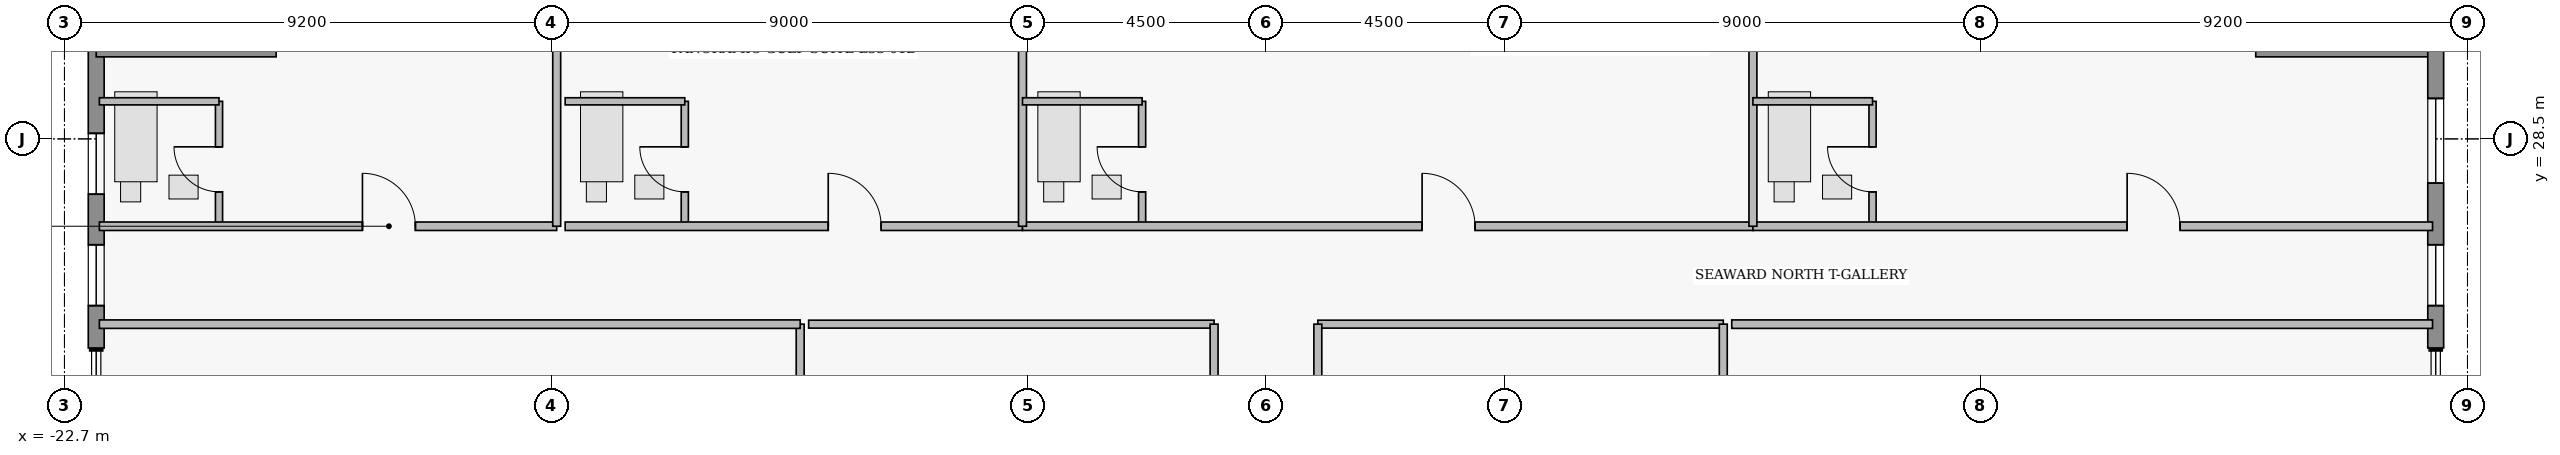
"""IFC4 building model, lengths in metres.
Left out: names, types, materials, properties, quantities, classifications, styles, units other than length and angle.
Written with IfcOpenShell. Run it as: python <this file> out.ifc"""

import sys

from ifc_helpers import new_model, si_unit, direction, frame, frame_2d, origin, place, context, subcontext, project, spatial, rectangle, extrude, element, fill, save


model = new_model("IFC4")
c1 = context("Model", 3, precision=1e-05, world=origin(), true_north=direction((0.0, 1.0)))
c2 = subcontext(c1, "Body", "Model", "MODEL_VIEW")
j1 = project(units=[si_unit("LENGTHUNIT", "METRE"), si_unit("PLANEANGLEUNIT", "RADIAN")], contexts=[c1])
p1 = place(None, origin())
s1 = spatial("IfcSite", under=j1, at=p1, CompositionType="ELEMENT")
p2 = place(p1, origin())
s2 = spatial("IfcBuilding", under=s1, at=p2, CompositionType="ELEMENT")
p3 = place(p2, frame((0.0, 0.0, 211.15)))
s3 = spatial("IfcBuildingStorey", under=s2, at=p3, CompositionType="ELEMENT", Elevation=211.15)
p4 = place(p3, frame((-22.1, 24.55, 0.0), z_axis=(0.0, 0.0, 1.0), x_axis=(0.0, 1.0, 0.0)))
e1 = element("IfcWall", 1, at=p4, inside=s3, PredefinedType="STANDARD", context=c2, shape_type="SweptSolid", body=[
    extrude(rectangle(XDim=5.65, YDim=0.3, at=frame_2d((2.825, 0.0))), origin(), (0.0, 0.0, 1.0), 3.53),
])
p5 = place(p4, frame((0.8, 0.0, 0.95)))
e2 = element("IfcOpeningElement", 2, at=p5, cuts=e1, PredefinedType="OPENING", context=c2, shape_type="SweptSolid", body=[
    extrude(rectangle(XDim=1.15, YDim=1.55, at=frame_2d((0.575, 0.775))), frame((0.0, 0.16, 0.0), z_axis=(0.0, -1.0, 0.0), x_axis=(1.0, 0.0, 0.0)), (0.0, 0.0, 1.0), 0.32),
])
p6 = place(p4, frame((2.905, 0.0, 0.95)))
e3 = element("IfcOpeningElement", 3, at=p6, cuts=e1, PredefinedType="OPENING", context=c2, shape_type="SweptSolid", body=[
    extrude(rectangle(XDim=1.15, YDim=1.55, at=frame_2d((0.575, 0.775))), frame((0.0, 0.16, 0.0), z_axis=(0.0, -1.0, 0.0), x_axis=(1.0, 0.0, 0.0)), (0.0, 0.0, 1.0), 0.32),
])
for number, where, z_axis, x_axis in (
    (4, (-22.1, 30.2, 0.0), (0.0, 0.0, 1.0), (1.0, 0.0, 0.0)),
    (5, (18.7, 30.2, 0.0), (0.0, 0.0, 1.0), (1.0, 0.0, 0.0)),
):
    element("IfcWall", number, at=place(p3, frame(where, z_axis=z_axis, x_axis=x_axis)), inside=s3, PredefinedType="STANDARD", context=c2, shape_type="SweptSolid", body=[
        extrude(rectangle(XDim=3.4, YDim=0.3, at=frame_2d((1.7, 0.0))), origin(), (0.0, 0.0, 1.0), 3.53),
    ])
p7 = place(p3, frame((22.1, 30.2, 0.0), z_axis=(0.0, 0.0, 1.0), x_axis=(0.0, -1.0, 0.0)))
e6 = element("IfcWall", 6, at=p7, inside=s3, PredefinedType="STANDARD", context=c2, shape_type="SweptSolid", body=[
    extrude(rectangle(XDim=5.65, YDim=0.3, at=frame_2d((2.825, 0.0))), origin(), (0.0, 0.0, 1.0), 3.53),
])
p8 = place(p7, frame((0.935, 0.0, 0.85)))
e7 = element("IfcOpeningElement", 7, at=p8, cuts=e6, PredefinedType="OPENING", context=c2, shape_type="SweptSolid", body=[
    extrude(rectangle(XDim=1.6, YDim=1.8, at=frame_2d((0.8, 0.9))), frame((0.0, 0.16, 0.0), z_axis=(0.0, -1.0, 0.0), x_axis=(1.0, 0.0, 0.0)), (0.0, 0.0, 1.0), 0.32),
])
p9 = place(p7, frame((3.7, 0.0, 0.95)))
e8 = element("IfcOpeningElement", 8, at=p9, cuts=e6, PredefinedType="OPENING", context=c2, shape_type="SweptSolid", body=[
    extrude(rectangle(XDim=1.15, YDim=1.55, at=frame_2d((0.575, 0.775))), frame((0.0, 0.16, 0.0), z_axis=(0.0, -1.0, 0.0), x_axis=(1.0, 0.0, 0.0)), (0.0, 0.0, 1.0), 0.32),
])
p10 = place(p3, frame((-19.78, 26.85, 0.0), z_axis=(0.0, 0.0, 1.0), x_axis=(0.0, 1.0, 0.0)))
e9 = element("IfcWall", 9, at=p10, inside=s3, PredefinedType="PLUMBINGWALL", context=c2, shape_type="SweptSolid", body=[
    extrude(rectangle(XDim=2.36, YDim=0.135, at=frame_2d((1.18, 0.0))), origin(), (0.0, 0.0, 1.0), 3.53),
])
p11 = place(p10, frame((0.65, 0.0, 0.0)))
e10 = element("IfcOpeningElement", 10, at=p11, cuts=e9, PredefinedType="OPENING", context=c2, shape_type="SweptSolid", body=[
    extrude(rectangle(XDim=0.85, YDim=2.1, at=frame_2d((0.425, 1.05))), frame((0.0, 0.077, 0.0), z_axis=(0.0, -1.0, 0.0), x_axis=(1.0, 0.0, 0.0)), (0.0, 0.0, 1.0), 0.155),
])
p12 = place(p3, frame((-22.04, 26.85, 0.0), z_axis=(0.0, 0.0, 1.0), x_axis=(1.0, 0.0, 0.0)))
e11 = element("IfcWall", 11, at=p12, inside=s3, PredefinedType="PARTITIONING", context=c2, shape_type="SweptSolid", body=[
    extrude(rectangle(XDim=8.64, YDim=0.16, at=frame_2d((4.32, 0.0))), origin(), (0.0, 0.0, 1.0), 3.53),
])
p13 = place(p12, frame((4.97, 0.0, 0.0)))
e12 = element("IfcOpeningElement", 12, at=p13, cuts=e11, PredefinedType="OPENING", context=c2, shape_type="SweptSolid", body=[
    extrude(rectangle(XDim=1.0, YDim=2.15, at=frame_2d((0.5, 1.075))), frame((0.0, 0.09, 0.0), z_axis=(0.0, -1.0, 0.0), x_axis=(1.0, 0.0, 0.0)), (0.0, 0.0, 1.0), 0.18),
])
p14 = place(p3, frame((-10.98, 26.85, 0.0), z_axis=(0.0, 0.0, 1.0), x_axis=(0.0, 1.0, 0.0)))
e13 = element("IfcWall", 13, at=p14, inside=s3, PredefinedType="PLUMBINGWALL", context=c2, shape_type="SweptSolid", body=[
    extrude(rectangle(XDim=2.36, YDim=0.135, at=frame_2d((1.18, 0.0))), origin(), (0.0, 0.0, 1.0), 3.53),
])
p15 = place(p14, frame((0.65, 0.0, 0.0)))
e14 = element("IfcOpeningElement", 14, at=p15, cuts=e13, PredefinedType="OPENING", context=c2, shape_type="SweptSolid", body=[
    extrude(rectangle(XDim=0.85, YDim=2.1, at=frame_2d((0.425, 1.05))), frame((0.0, 0.077, 0.0), z_axis=(0.0, -1.0, 0.0), x_axis=(1.0, 0.0, 0.0)), (0.0, 0.0, 1.0), 0.155),
])
p16 = place(p3, frame((-13.24, 26.85, 0.0), z_axis=(0.0, 0.0, 1.0), x_axis=(1.0, 0.0, 0.0)))
e15 = element("IfcWall", 15, at=p16, inside=s3, PredefinedType="PARTITIONING", context=c2, shape_type="SweptSolid", body=[
    extrude(rectangle(XDim=8.64, YDim=0.16, at=frame_2d((4.32, 0.0))), origin(), (0.0, 0.0, 1.0), 3.53),
])
p17 = place(p16, frame((4.97, 0.0, 0.0)))
e16 = element("IfcOpeningElement", 16, at=p17, cuts=e15, PredefinedType="OPENING", context=c2, shape_type="SweptSolid", body=[
    extrude(rectangle(XDim=1.0, YDim=2.15, at=frame_2d((0.5, 1.075))), frame((0.0, 0.09, 0.0), z_axis=(0.0, -1.0, 0.0), x_axis=(1.0, 0.0, 0.0)), (0.0, 0.0, 1.0), 0.18),
])
p18 = place(p3, frame((-2.34, 26.85, 0.0), z_axis=(0.0, 0.0, 1.0), x_axis=(0.0, 1.0, 0.0)))
e17 = element("IfcWall", 17, at=p18, inside=s3, PredefinedType="PLUMBINGWALL", context=c2, shape_type="SweptSolid", body=[
    extrude(rectangle(XDim=2.36, YDim=0.135, at=frame_2d((1.18, 0.0))), origin(), (0.0, 0.0, 1.0), 3.53),
])
p19 = place(p18, frame((0.65, 0.0, 0.0)))
e18 = element("IfcOpeningElement", 18, at=p19, cuts=e17, PredefinedType="OPENING", context=c2, shape_type="SweptSolid", body=[
    extrude(rectangle(XDim=0.85, YDim=2.1, at=frame_2d((0.425, 1.05))), frame((0.0, 0.077, 0.0), z_axis=(0.0, -1.0, 0.0), x_axis=(1.0, 0.0, 0.0)), (0.0, 0.0, 1.0), 0.155),
])
p20 = place(p3, frame((-4.6, 26.85, 0.0), z_axis=(0.0, 0.0, 1.0), x_axis=(1.0, 0.0, 0.0)))
e19 = element("IfcWall", 19, at=p20, inside=s3, PredefinedType="PARTITIONING", context=c2, shape_type="SweptSolid", body=[
    extrude(rectangle(XDim=13.8, YDim=0.16, at=frame_2d((6.9, 0.0))), origin(), (0.0, 0.0, 1.0), 3.53),
])
p21 = place(p20, frame((7.55, 0.0, 0.0)))
e20 = element("IfcOpeningElement", 20, at=p21, cuts=e19, PredefinedType="OPENING", context=c2, shape_type="SweptSolid", body=[
    extrude(rectangle(XDim=1.0, YDim=2.15, at=frame_2d((0.5, 1.075))), frame((0.0, 0.09, 0.0), z_axis=(0.0, -1.0, 0.0), x_axis=(1.0, 0.0, 0.0)), (0.0, 0.0, 1.0), 0.18),
])
p22 = place(p3, frame((11.46, 26.85, 0.0), z_axis=(0.0, 0.0, 1.0), x_axis=(0.0, 1.0, 0.0)))
e21 = element("IfcWall", 21, at=p22, inside=s3, PredefinedType="PLUMBINGWALL", context=c2, shape_type="SweptSolid", body=[
    extrude(rectangle(XDim=2.36, YDim=0.135, at=frame_2d((1.18, 0.0))), origin(), (0.0, 0.0, 1.0), 3.53),
])
p23 = place(p22, frame((0.65, 0.0, 0.0)))
e22 = element("IfcOpeningElement", 22, at=p23, cuts=e21, PredefinedType="OPENING", context=c2, shape_type="SweptSolid", body=[
    extrude(rectangle(XDim=0.85, YDim=2.1, at=frame_2d((0.425, 1.05))), frame((0.0, 0.077, 0.0), z_axis=(0.0, -1.0, 0.0), x_axis=(1.0, 0.0, 0.0)), (0.0, 0.0, 1.0), 0.155),
])
p24 = place(p3, frame((9.2, 26.85, 0.0), z_axis=(0.0, 0.0, 1.0), x_axis=(1.0, 0.0, 0.0)))
e23 = element("IfcWall", 23, at=p24, inside=s3, PredefinedType="PARTITIONING", context=c2, shape_type="SweptSolid", body=[
    extrude(rectangle(XDim=12.84, YDim=0.16, at=frame_2d((6.42, 0.0))), origin(), (0.0, 0.0, 1.0), 3.53),
])
p25 = place(p24, frame((7.07, 0.0, 0.0)))
e24 = element("IfcOpeningElement", 24, at=p25, cuts=e23, PredefinedType="OPENING", context=c2, shape_type="SweptSolid", body=[
    extrude(rectangle(XDim=1.0, YDim=2.15, at=frame_2d((0.5, 1.075))), frame((0.0, 0.09, 0.0), z_axis=(0.0, -1.0, 0.0), x_axis=(1.0, 0.0, 0.0)), (0.0, 0.0, 1.0), 0.18),
])
p26 = place(p3, frame((-22.04, 29.21, 0.0), z_axis=(0.0, 0.0, 1.0), x_axis=(1.0, 0.0, 0.0)))
e25 = element("IfcWall", 25, at=p26, inside=s3, PredefinedType="PLUMBINGWALL", context=c2, shape_type="SweptSolid", body=[
    extrude(rectangle(XDim=2.26, YDim=0.135, at=frame_2d((1.13, 0.0))), origin(), (0.0, 0.0, 1.0), 3.53),
])
p27 = place(p3, frame((-13.4, 26.85, 0.0), z_axis=(0.0, 0.0, 1.0), x_axis=(0.0, 1.0, 0.0)))
e26 = element("IfcWall", 26, at=p27, inside=s3, PredefinedType="PARTITIONING", context=c2, shape_type="SweptSolid", body=[
    extrude(rectangle(XDim=6.67, YDim=0.15, at=frame_2d((3.335, 0.0))), origin(), (0.0, 0.0, 1.0), 2.519),
])
p28 = place(p3, frame((-13.24, 29.21, 0.0), z_axis=(0.0, 0.0, 1.0), x_axis=(1.0, 0.0, 0.0)))
e27 = element("IfcWall", 27, at=p28, inside=s3, PredefinedType="PLUMBINGWALL", context=c2, shape_type="SweptSolid", body=[
    extrude(rectangle(XDim=2.26, YDim=0.135, at=frame_2d((1.13, 0.0))), origin(), (0.0, 0.0, 1.0), 3.53),
])
p29 = place(p3, frame((-4.6, 26.85, 0.0), z_axis=(0.0, 0.0, 1.0), x_axis=(0.0, 1.0, 0.0)))
e28 = element("IfcWall", 28, at=p29, inside=s3, PredefinedType="PARTITIONING", context=c2, shape_type="SweptSolid", body=[
    extrude(rectangle(XDim=6.67, YDim=0.15, at=frame_2d((3.335, 0.0))), origin(), (0.0, 0.0, 1.0), 2.519),
])
p30 = place(p3, frame((-4.6, 29.21, 0.0), z_axis=(0.0, 0.0, 1.0), x_axis=(1.0, 0.0, 0.0)))
e29 = element("IfcWall", 29, at=p30, inside=s3, PredefinedType="PLUMBINGWALL", context=c2, shape_type="SweptSolid", body=[
    extrude(rectangle(XDim=2.26, YDim=0.135, at=frame_2d((1.13, 0.0))), origin(), (0.0, 0.0, 1.0), 3.53),
])
p31 = place(p3, frame((9.2, 26.85, 0.0), z_axis=(0.0, 0.0, 1.0), x_axis=(0.0, 1.0, 0.0)))
e30 = element("IfcWall", 30, at=p31, inside=s3, PredefinedType="PARTITIONING", context=c2, shape_type="SweptSolid", body=[
    extrude(rectangle(XDim=6.67, YDim=0.15, at=frame_2d((3.335, 0.0))), origin(), (0.0, 0.0, 1.0), 3.53),
])
p32 = place(p3, frame((9.2, 29.21, 0.0), z_axis=(0.0, 0.0, 1.0), x_axis=(1.0, 0.0, 0.0)))
e31 = element("IfcWall", 31, at=p32, inside=s3, PredefinedType="PLUMBINGWALL", context=c2, shape_type="SweptSolid", body=[
    extrude(rectangle(XDim=2.26, YDim=0.135, at=frame_2d((1.13, 0.0))), origin(), (0.0, 0.0, 1.0), 3.53),
])
p33 = place(p3, frame((-8.8, 16.7, 0.0), z_axis=(0.0, 0.0, 1.0), x_axis=(0.0, 1.0, 0.0)))
e32 = element("IfcWall", 32, at=p33, inside=s3, PredefinedType="PARTITIONING", context=c2, shape_type="SweptSolid", body=[
    extrude(rectangle(XDim=8.3, YDim=0.15, at=frame_2d((4.15, 0.0))), origin(), (0.0, 0.0, 1.0), 3.53),
])
p34 = place(p3, frame((-22.04, 25.0, 0.0), z_axis=(0.0, 0.0, 1.0), x_axis=(1.0, 0.0, 0.0)))
e33 = element("IfcWall", 33, at=p34, inside=s3, PredefinedType="PARTITIONING", context=c2, shape_type="SweptSolid", body=[
    extrude(rectangle(XDim=13.24, YDim=0.16, at=frame_2d((6.62, 0.0))), origin(), (0.0, 0.0, 1.0), 3.124),
])
p35 = place(p3, frame((-8.64, 25.0, 0.0), z_axis=(0.0, 0.0, 1.0), x_axis=(1.0, 0.0, 0.0)))
e34 = element("IfcWall", 34, at=p35, inside=s3, PredefinedType="PARTITIONING", context=c2, shape_type="SweptSolid", body=[
    extrude(rectangle(XDim=7.66, YDim=0.15, at=frame_2d((3.83, 0.0))), origin(), (0.0, 0.0, 1.0), 3.124),
])
p36 = place(p3, frame((-0.98, 16.7, 0.0), z_axis=(0.0, 0.0, 1.0), x_axis=(0.0, 1.0, 0.0)))
e35 = element("IfcWall", 35, at=p36, inside=s3, PredefinedType="PARTITIONING", context=c2, shape_type="SweptSolid", body=[
    extrude(rectangle(XDim=8.3, YDim=0.15, at=frame_2d((4.15, 0.0))), origin(), (0.0, 0.0, 1.0), 3.53),
])
p37 = place(p3, frame((0.98, 25.0, 0.0), z_axis=(0.0, 0.0, 1.0), x_axis=(1.0, 0.0, 0.0)))
e36 = element("IfcWall", 36, at=p37, inside=s3, PredefinedType="PARTITIONING", context=c2, shape_type="SweptSolid", body=[
    extrude(rectangle(XDim=7.66, YDim=0.15, at=frame_2d((3.83, 0.0))), origin(), (0.0, 0.0, 1.0), 3.124),
])
for number, where, z_axis, x_axis in (
    (37, (0.98, 16.7, 0.0), (0.0, 0.0, 1.0), (0.0, 1.0, 0.0)),
    (38, (8.64, 16.7, 0.0), (0.0, 0.0, 1.0), (0.0, 1.0, 0.0)),
):
    element("IfcWall", number, at=place(p3, frame(where, z_axis=z_axis, x_axis=x_axis)), inside=s3, PredefinedType="PARTITIONING", context=c2, shape_type="SweptSolid", body=[
        extrude(rectangle(XDim=8.3, YDim=0.15, at=frame_2d((4.15, 0.0))), origin(), (0.0, 0.0, 1.0), 3.53),
    ])
p38 = place(p3, frame((8.8, 25.0, 0.0), z_axis=(0.0, 0.0, 1.0), x_axis=(1.0, 0.0, 0.0)))
e39 = element("IfcWall", 39, at=p38, inside=s3, PredefinedType="PARTITIONING", context=c2, shape_type="SweptSolid", body=[
    extrude(rectangle(XDim=13.24, YDim=0.16, at=frame_2d((6.62, 0.0))), origin(), (0.0, 0.0, 1.0), 3.124),
])
p39 = place(p5, origin())
e40 = element("IfcWindow", 40, at=p39, inside=s3, PartitioningType="SINGLE_PANEL", PredefinedType="WINDOW", context=c2, shape_type="SweptSolid", body=[
    extrude(rectangle(XDim=1.15, YDim=1.55, at=frame_2d((0.575, 0.775))), frame((0.0, 0.03, 0.0), z_axis=(0.0, -1.0, 0.0), x_axis=(1.0, 0.0, 0.0)), (0.0, 0.0, 1.0), 0.06),
])
fill(e2, e40)
p40 = place(p6, origin())
e41 = element("IfcWindow", 41, at=p40, inside=s3, PartitioningType="SINGLE_PANEL", PredefinedType="WINDOW", context=c2, shape_type="SweptSolid", body=[
    extrude(rectangle(XDim=1.15, YDim=1.55, at=frame_2d((0.575, 0.775))), frame((0.0, 0.03, 0.0), z_axis=(0.0, -1.0, 0.0), x_axis=(1.0, 0.0, 0.0)), (0.0, 0.0, 1.0), 0.06),
])
fill(e3, e41)
p41 = place(p8, origin())
e42 = element("IfcWindow", 42, at=p41, inside=s3, PartitioningType="SINGLE_PANEL", PredefinedType="WINDOW", context=c2, shape_type="SweptSolid", body=[
    extrude(rectangle(XDim=1.6, YDim=1.8, at=frame_2d((0.8, 0.9))), frame((0.0, 0.03, 0.0), z_axis=(0.0, -1.0, 0.0), x_axis=(1.0, 0.0, 0.0)), (0.0, 0.0, 1.0), 0.06),
])
fill(e7, e42)
p42 = place(p9, origin())
e43 = element("IfcWindow", 43, at=p42, inside=s3, PartitioningType="SINGLE_PANEL", PredefinedType="WINDOW", context=c2, shape_type="SweptSolid", body=[
    extrude(rectangle(XDim=1.15, YDim=1.55, at=frame_2d((0.575, 0.775))), frame((0.0, 0.03, 0.0), z_axis=(0.0, -1.0, 0.0), x_axis=(1.0, 0.0, 0.0)), (0.0, 0.0, 1.0), 0.06),
])
fill(e8, e43)
p43 = place(p11, origin())
e44 = element("IfcDoor", 44, at=p43, inside=s3, OperationType="SINGLE_SWING_RIGHT", PredefinedType="DOOR", context=c2, shape_type="SweptSolid", body=[
    extrude(rectangle(XDim=0.85, YDim=2.1, at=frame_2d((0.425, 1.05))), frame((0.0, 0.025, 0.0), z_axis=(0.0, -1.0, 0.0), x_axis=(1.0, 0.0, 0.0)), (0.0, 0.0, 1.0), 0.05),
])
fill(e10, e44)
p44 = place(p13, origin())
e45 = element("IfcDoor", 45, at=p44, inside=s3, OperationType="SINGLE_SWING_LEFT", PredefinedType="DOOR", context=c2, shape_type="SweptSolid", body=[
    extrude(rectangle(XDim=1.0, YDim=2.15, at=frame_2d((0.5, 1.075))), frame((0.0, 0.025, 0.0), z_axis=(0.0, -1.0, 0.0), x_axis=(1.0, 0.0, 0.0)), (0.0, 0.0, 1.0), 0.05),
])
fill(e12, e45)
p45 = place(p15, origin())
e46 = element("IfcDoor", 46, at=p45, inside=s3, OperationType="SINGLE_SWING_RIGHT", PredefinedType="DOOR", context=c2, shape_type="SweptSolid", body=[
    extrude(rectangle(XDim=0.85, YDim=2.1, at=frame_2d((0.425, 1.05))), frame((0.0, 0.025, 0.0), z_axis=(0.0, -1.0, 0.0), x_axis=(1.0, 0.0, 0.0)), (0.0, 0.0, 1.0), 0.05),
])
fill(e14, e46)
p46 = place(p17, origin())
e47 = element("IfcDoor", 47, at=p46, inside=s3, OperationType="SINGLE_SWING_LEFT", PredefinedType="DOOR", context=c2, shape_type="SweptSolid", body=[
    extrude(rectangle(XDim=1.0, YDim=2.15, at=frame_2d((0.5, 1.075))), frame((0.0, 0.025, 0.0), z_axis=(0.0, -1.0, 0.0), x_axis=(1.0, 0.0, 0.0)), (0.0, 0.0, 1.0), 0.05),
])
fill(e16, e47)
p47 = place(p19, origin())
e48 = element("IfcDoor", 48, at=p47, inside=s3, OperationType="SINGLE_SWING_RIGHT", PredefinedType="DOOR", context=c2, shape_type="SweptSolid", body=[
    extrude(rectangle(XDim=0.85, YDim=2.1, at=frame_2d((0.425, 1.05))), frame((0.0, 0.025, 0.0), z_axis=(0.0, -1.0, 0.0), x_axis=(1.0, 0.0, 0.0)), (0.0, 0.0, 1.0), 0.05),
])
fill(e18, e48)
p48 = place(p21, origin())
e49 = element("IfcDoor", 49, at=p48, inside=s3, OperationType="SINGLE_SWING_LEFT", PredefinedType="DOOR", context=c2, shape_type="SweptSolid", body=[
    extrude(rectangle(XDim=1.0, YDim=2.15, at=frame_2d((0.5, 1.075))), frame((0.0, 0.025, 0.0), z_axis=(0.0, -1.0, 0.0), x_axis=(1.0, 0.0, 0.0)), (0.0, 0.0, 1.0), 0.05),
])
fill(e20, e49)
p49 = place(p23, origin())
e50 = element("IfcDoor", 50, at=p49, inside=s3, OperationType="SINGLE_SWING_RIGHT", PredefinedType="DOOR", context=c2, shape_type="SweptSolid", body=[
    extrude(rectangle(XDim=0.85, YDim=2.1, at=frame_2d((0.425, 1.05))), frame((0.0, 0.025, 0.0), z_axis=(0.0, -1.0, 0.0), x_axis=(1.0, 0.0, 0.0)), (0.0, 0.0, 1.0), 0.05),
])
fill(e22, e50)
p50 = place(p25, origin())
e51 = element("IfcDoor", 51, at=p50, inside=s3, OperationType="SINGLE_SWING_LEFT", PredefinedType="DOOR", context=c2, shape_type="SweptSolid", body=[
    extrude(rectangle(XDim=1.0, YDim=2.15, at=frame_2d((0.5, 1.075))), frame((0.0, 0.025, 0.0), z_axis=(0.0, -1.0, 0.0), x_axis=(1.0, 0.0, 0.0)), (0.0, 0.0, 1.0), 0.05),
])
fill(e24, e51)
save(model, sys.argv[1])
